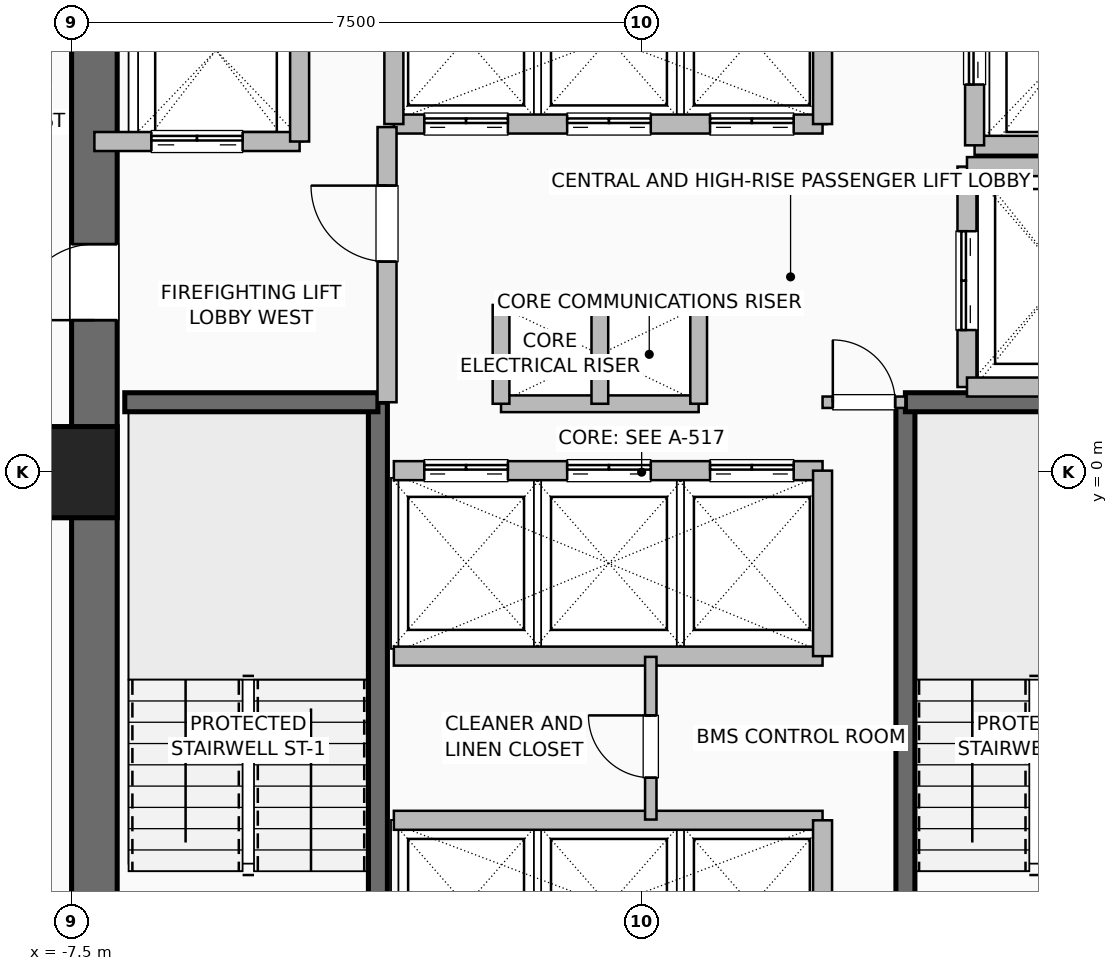
"""IFC4 building model, lengths in metres.
Left out: names, types, materials, properties, quantities, classifications, styles, units other than length and angle.
Written with IfcOpenShell. Run it as: python <this file> out.ifc"""

import sys

from ifc_helpers import new_model, si_unit, direction, frame, frame_2d, origin, origin_2d, place, context, subcontext, project, spatial, rectangle, hollow_rectangle, extrude, element, fill, save


model = new_model("IFC4")
c1 = context("Model", 3, precision=1e-05, world=origin(), true_north=direction((0.0, 1.0)))
c2 = subcontext(c1, "Body", "Model", "MODEL_VIEW")
j1 = project(units=[si_unit("LENGTHUNIT", "METRE"), si_unit("PLANEANGLEUNIT", "RADIAN")], contexts=[c1])
p1 = place(None, origin())
s1 = spatial("IfcSite", under=j1, at=p1, CompositionType="ELEMENT")
p2 = place(p1, origin())
s2 = spatial("IfcBuilding", under=s1, at=p2, CompositionType="ELEMENT")
p3 = place(p2, frame((0.0, 0.0, 62.0)))
s3 = spatial("IfcBuildingStorey", under=s2, at=p3, CompositionType="ELEMENT", Elevation=62.0)
p4 = place(p3, frame((-7.5, 0.0, 0.0), z_axis=(0.0, 0.0, 1.0), x_axis=(1.0, 0.0, 0.0)))
e1 = element("IfcColumn", 1, at=p4, inside=s3, PredefinedType="COLUMN", context=c2, shape_type="SweptSolid", body=[
    extrude(hollow_rectangle(XDim=1.2, YDim=1.2, WallThickness=0.055, at=origin_2d()), origin(), (0.0, 0.0, 1.0), 3.5),
])
p5 = place(p3, frame((-7.2, -7.5, 0.0), z_axis=(0.0, 0.0, 1.0), x_axis=(0.0, 1.0, 0.0)))
e2 = element("IfcWall", 2, at=p5, inside=s3, PredefinedType="SHEAR", context=c2, shape_type="SweptSolid", body=[
    extrude(rectangle(XDim=15.0, YDim=0.6, at=frame_2d((7.5, 0.0))), origin(), (0.0, 0.0, 1.0), 3.25),
])
p6 = place(p5, frame((9.5, 0.0, 0.0)))
e3 = element("IfcOpeningElement", 3, at=p6, cuts=e2, PredefinedType="OPENING", context=c2, shape_type="SweptSolid", body=[
    extrude(rectangle(XDim=1.0, YDim=2.08, at=frame_2d((0.5, 1.04))), frame((0.0, 0.31, 0.0), z_axis=(0.0, -1.0, 0.0), x_axis=(1.0, 0.0, 0.0)), (0.0, 0.0, 1.0), 0.62),
])
p7 = place(p3, frame((-3.47, -6.8, 0.0), z_axis=(0.0, 0.0, 1.0), x_axis=(0.0, 1.0, 0.0)))
e4 = element("IfcWall", 4, at=p7, inside=s3, PredefinedType="SHEAR", context=c2, shape_type="SweptSolid", body=[
    extrude(rectangle(XDim=7.72, YDim=0.25, at=frame_2d((3.86, 0.0))), origin(), (0.0, 0.0, 1.0), 3.25),
])
p8 = place(p3, frame((-6.8, 0.92, 0.0), z_axis=(0.0, 0.0, 1.0), x_axis=(1.0, 0.0, 0.0)))
e5 = element("IfcWall", 5, at=p8, inside=s3, PredefinedType="SHEAR", context=c2, shape_type="SweptSolid", body=[
    extrude(rectangle(XDim=3.33, YDim=0.25, at=frame_2d((1.665, 0.0))), origin(), (0.0, 0.0, 1.0), 3.25),
])
p9 = place(p3, frame((3.47, -6.8, 0.0), z_axis=(0.0, 0.0, 1.0), x_axis=(0.0, 1.0, 0.0)))
e6 = element("IfcWall", 6, at=p9, inside=s3, PredefinedType="SHEAR", context=c2, shape_type="SweptSolid", body=[
    extrude(rectangle(XDim=7.72, YDim=0.25, at=frame_2d((3.86, 0.0))), origin(), (0.0, 0.0, 1.0), 3.25),
])
p10 = place(p3, frame((3.47, 0.92, 0.0), z_axis=(0.0, 0.0, 1.0), x_axis=(1.0, 0.0, 0.0)))
e7 = element("IfcWall", 7, at=p10, inside=s3, PredefinedType="SHEAR", context=c2, shape_type="SweptSolid", body=[
    extrude(rectangle(XDim=3.33, YDim=0.25, at=frame_2d((1.665, 0.0))), origin(), (0.0, 0.0, 1.0), 3.25),
])
for number, where, z_axis, x_axis in (
    (8, (-1.85, 2.2, 0.0), (0.0, 0.0, 1.0), (1.0, 0.0, 0.0)),
    (9, (-1.85, 0.9, 0.0), (0.0, 0.0, 1.0), (1.0, 0.0, 0.0)),
):
    element("IfcWall", number, at=place(p3, frame(where, z_axis=z_axis, x_axis=x_axis)), inside=s3, PredefinedType="PARTITIONING", context=c2, shape_type="SweptSolid", body=[
        extrude(rectangle(XDim=2.6, YDim=0.22, at=frame_2d((1.3, 0.0))), origin(), (0.0, 0.0, 1.0), 3.25),
    ])
for number, where, z_axis, x_axis in (
    (10, (-0.55, 0.9, 0.0), (0.0, 0.0, 1.0), (0.0, 1.0, 0.0)),
    (11, (0.75, 0.9, 0.0), (0.0, 0.0, 1.0), (0.0, 1.0, 0.0)),
    (12, (-1.85, 0.9, 0.0), (0.0, 0.0, 1.0), (0.0, 1.0, 0.0)),
):
    element("IfcWall", number, at=place(p3, frame(where, z_axis=z_axis, x_axis=x_axis)), inside=s3, PredefinedType="PARTITIONING", context=c2, shape_type="SweptSolid", body=[
        extrude(rectangle(XDim=1.3, YDim=0.22, at=frame_2d((0.65, 0.0))), origin(), (0.0, 0.0, 1.0), 3.25),
    ])
p11 = place(p3, frame((-3.26, -4.58, 0.0), z_axis=(0.0, 0.0, 1.0), x_axis=(1.0, 0.0, 0.0)))
e13 = element("IfcWall", 13, at=p11, inside=s3, PredefinedType="SHEAR", context=c2, shape_type="SweptSolid", body=[
    extrude(rectangle(XDim=5.64, YDim=0.25, at=frame_2d((2.82, 0.0))), origin(), (0.0, 0.0, 1.0), 3.25),
])
p12 = place(p3, frame((2.38, -6.8, 0.0), z_axis=(0.0, 0.0, 1.0), x_axis=(0.0, 1.0, 0.0)))
e14 = element("IfcWall", 14, at=p12, inside=s3, PredefinedType="SHEAR", context=c2, shape_type="SweptSolid", body=[
    extrude(rectangle(XDim=2.22, YDim=0.25, at=frame_2d((1.11, 0.0))), origin(), (0.0, 0.0, 1.0), 3.25),
])
p13 = place(p3, frame((-3.26, 0.02, 0.0), z_axis=(0.0, 0.0, 1.0), x_axis=(1.0, 0.0, 0.0)))
e15 = element("IfcWall", 15, at=p13, inside=s3, PredefinedType="SHEAR", context=c2, shape_type="SweptSolid", body=[
    extrude(rectangle(XDim=5.64, YDim=0.25, at=frame_2d((2.82, 0.0))), origin(), (0.0, 0.0, 1.0), 3.25),
])
p14 = place(p13, frame((0.4, 0.0, 0.0)))
e16 = element("IfcOpeningElement", 16, at=p14, cuts=e15, PredefinedType="OPENING", context=c2, shape_type="SweptSolid", body=[
    extrude(rectangle(XDim=1.1, YDim=2.2, at=frame_2d((0.55, 1.1))), frame((0.0, 0.135, 0.0), z_axis=(0.0, -1.0, 0.0), x_axis=(1.0, 0.0, 0.0)), (0.0, 0.0, 1.0), 0.27),
])
p15 = place(p13, frame((2.28, 0.0, 0.0)))
e17 = element("IfcOpeningElement", 17, at=p15, cuts=e15, PredefinedType="OPENING", context=c2, shape_type="SweptSolid", body=[
    extrude(rectangle(XDim=1.1, YDim=2.2, at=frame_2d((0.55, 1.1))), frame((0.0, 0.135, 0.0), z_axis=(0.0, -1.0, 0.0), x_axis=(1.0, 0.0, 0.0)), (0.0, 0.0, 1.0), 0.27),
])
p16 = place(p13, frame((4.16, 0.0, 0.0)))
e18 = element("IfcOpeningElement", 18, at=p16, cuts=e15, PredefinedType="OPENING", context=c2, shape_type="SweptSolid", body=[
    extrude(rectangle(XDim=1.1, YDim=2.2, at=frame_2d((0.55, 1.1))), frame((0.0, 0.135, 0.0), z_axis=(0.0, -1.0, 0.0), x_axis=(1.0, 0.0, 0.0)), (0.0, 0.0, 1.0), 0.27),
])
p17 = place(p3, frame((-3.26, -2.42, 0.0), z_axis=(0.0, 0.0, 1.0), x_axis=(1.0, 0.0, 0.0)))
e19 = element("IfcWall", 19, at=p17, inside=s3, PredefinedType="SHEAR", context=c2, shape_type="SweptSolid", body=[
    extrude(rectangle(XDim=5.64, YDim=0.25, at=frame_2d((2.82, 0.0))), origin(), (0.0, 0.0, 1.0), 3.25),
])
p18 = place(p3, frame((2.38, -2.42, 0.0), z_axis=(0.0, 0.0, 1.0), x_axis=(0.0, 1.0, 0.0)))
e20 = element("IfcWall", 20, at=p18, inside=s3, PredefinedType="SHEAR", context=c2, shape_type="SweptSolid", body=[
    extrude(rectangle(XDim=2.44, YDim=0.25, at=frame_2d((1.22, 0.0))), origin(), (0.0, 0.0, 1.0), 3.25),
])
p19 = place(p3, frame((-3.26, 4.58, 0.0), z_axis=(0.0, 0.0, 1.0), x_axis=(1.0, 0.0, 0.0)))
e21 = element("IfcWall", 21, at=p19, inside=s3, PredefinedType="SHEAR", context=c2, shape_type="SweptSolid", body=[
    extrude(rectangle(XDim=5.64, YDim=0.25, at=frame_2d((2.82, 0.0))), origin(), (0.0, 0.0, 1.0), 3.25),
])
p20 = place(p19, frame((0.4, 0.0, 0.0)))
e22 = element("IfcOpeningElement", 22, at=p20, cuts=e21, PredefinedType="OPENING", context=c2, shape_type="SweptSolid", body=[
    extrude(rectangle(XDim=1.1, YDim=2.2, at=frame_2d((0.55, 1.1))), frame((0.0, 0.135, 0.0), z_axis=(0.0, -1.0, 0.0), x_axis=(1.0, 0.0, 0.0)), (0.0, 0.0, 1.0), 0.27),
])
p21 = place(p19, frame((2.28, 0.0, 0.0)))
e23 = element("IfcOpeningElement", 23, at=p21, cuts=e21, PredefinedType="OPENING", context=c2, shape_type="SweptSolid", body=[
    extrude(rectangle(XDim=1.1, YDim=2.2, at=frame_2d((0.55, 1.1))), frame((0.0, 0.135, 0.0), z_axis=(0.0, -1.0, 0.0), x_axis=(1.0, 0.0, 0.0)), (0.0, 0.0, 1.0), 0.27),
])
p22 = place(p19, frame((4.16, 0.0, 0.0)))
e24 = element("IfcOpeningElement", 24, at=p22, cuts=e21, PredefinedType="OPENING", context=c2, shape_type="SweptSolid", body=[
    extrude(rectangle(XDim=1.1, YDim=2.2, at=frame_2d((0.55, 1.1))), frame((0.0, 0.135, 0.0), z_axis=(0.0, -1.0, 0.0), x_axis=(1.0, 0.0, 0.0)), (0.0, 0.0, 1.0), 0.27),
])
for number, where, z_axis, x_axis in (
    (25, (-3.26, 4.58, 0.0), (0.0, 0.0, 1.0), (0.0, 1.0, 0.0)),
    (26, (2.38, 4.58, 0.0), (0.0, 0.0, 1.0), (0.0, 1.0, 0.0)),
):
    element("IfcWall", number, at=place(p3, frame(where, z_axis=z_axis, x_axis=x_axis)), inside=s3, PredefinedType="SHEAR", context=c2, shape_type="SweptSolid", body=[
        extrude(rectangle(XDim=2.22, YDim=0.25, at=frame_2d((1.11, 0.0))), origin(), (0.0, 0.0, 1.0), 3.25),
    ])
p23 = place(p3, frame((-7.2, 4.35, 0.0), z_axis=(0.0, 0.0, 1.0), x_axis=(1.0, 0.0, 0.0)))
e27 = element("IfcWall", 27, at=p23, inside=s3, PredefinedType="SHEAR", context=c2, shape_type="SweptSolid", body=[
    extrude(rectangle(XDim=2.7, YDim=0.25, at=frame_2d((1.35, 0.0))), origin(), (0.0, 0.0, 1.0), 3.25),
])
p24 = place(p23, frame((0.75, 0.0, 0.0)))
e28 = element("IfcOpeningElement", 28, at=p24, cuts=e27, PredefinedType="OPENING", context=c2, shape_type="SweptSolid", body=[
    extrude(rectangle(XDim=1.2, YDim=2.2, at=frame_2d((0.6, 1.1))), frame((0.0, 0.135, 0.0), z_axis=(0.0, -1.0, 0.0), x_axis=(1.0, 0.0, 0.0)), (0.0, 0.0, 1.0), 0.27),
])
p25 = place(p3, frame((-4.5, 4.35, 0.0), z_axis=(0.0, 0.0, 1.0), x_axis=(0.0, 1.0, 0.0)))
e29 = element("IfcWall", 29, at=p25, inside=s3, PredefinedType="SHEAR", context=c2, shape_type="SweptSolid", body=[
    extrude(rectangle(XDim=2.85, YDim=0.25, at=frame_2d((1.425, 0.0))), origin(), (0.0, 0.0, 1.0), 3.25),
])
p26 = place(p3, frame((4.38, 4.3, 0.0), z_axis=(0.0, 0.0, 1.0), x_axis=(1.0, 0.0, 0.0)))
e30 = element("IfcWall", 30, at=p26, inside=s3, PredefinedType="SHEAR", context=c2, shape_type="SweptSolid", body=[
    extrude(rectangle(XDim=2.42, YDim=0.25, at=frame_2d((1.21, 0.0))), origin(), (0.0, 0.0, 1.0), 3.25),
])
p27 = place(p3, frame((4.38, 4.3, 0.0), z_axis=(0.0, 0.0, 1.0), x_axis=(0.0, 1.0, 0.0)))
e31 = element("IfcWall", 31, at=p27, inside=s3, PredefinedType="SHEAR", context=c2, shape_type="SweptSolid", body=[
    extrude(rectangle(XDim=2.5, YDim=0.25, at=frame_2d((1.25, 0.0))), origin(), (0.0, 0.0, 1.0), 3.25),
])
p28 = place(p27, frame((0.8, 0.0, 0.0)))
e32 = element("IfcOpeningElement", 32, at=p28, cuts=e31, PredefinedType="OPENING", context=c2, shape_type="SweptSolid", body=[
    extrude(rectangle(XDim=1.2, YDim=2.2, at=frame_2d((0.6, 1.1))), frame((0.0, 0.135, 0.0), z_axis=(0.0, -1.0, 0.0), x_axis=(1.0, 0.0, 0.0)), (0.0, 0.0, 1.0), 0.27),
])
p29 = place(p3, frame((4.28, 1.12, 0.0), z_axis=(0.0, 0.0, 1.0), x_axis=(0.0, 1.0, 0.0)))
e33 = element("IfcWall", 33, at=p29, inside=s3, PredefinedType="SHEAR", context=c2, shape_type="SweptSolid", body=[
    extrude(rectangle(XDim=2.9, YDim=0.25, at=frame_2d((1.45, 0.0))), origin(), (0.0, 0.0, 1.0), 3.25),
])
p30 = place(p29, frame((0.75, 0.0, 0.0)))
e34 = element("IfcOpeningElement", 34, at=p30, cuts=e33, PredefinedType="OPENING", context=c2, shape_type="SweptSolid", body=[
    extrude(rectangle(XDim=1.3, YDim=2.3, at=frame_2d((0.65, 1.15))), frame((0.0, 0.135, 0.0), z_axis=(0.0, -1.0, 0.0), x_axis=(1.0, 0.0, 0.0)), (0.0, 0.0, 1.0), 0.27),
])
for number, where, z_axis, x_axis in (
    (35, (4.28, 1.12, 0.0), (0.0, 0.0, 1.0), (1.0, 0.0, 0.0)),
    (36, (4.28, 4.02, 0.0), (0.0, 0.0, 1.0), (1.0, 0.0, 0.0)),
):
    element("IfcWall", number, at=place(p3, frame(where, z_axis=z_axis, x_axis=x_axis)), inside=s3, PredefinedType="SHEAR", context=c2, shape_type="SweptSolid", body=[
        extrude(rectangle(XDim=2.52, YDim=0.25, at=frame_2d((1.26, 0.0))), origin(), (0.0, 0.0, 1.0), 3.25),
    ])
p31 = place(p3, frame((-3.35, 0.92, 0.0), z_axis=(0.0, 0.0, 1.0), x_axis=(0.0, 1.0, 0.0)))
e37 = element("IfcWall", 37, at=p31, inside=s3, PredefinedType="SHEAR", context=c2, shape_type="SweptSolid", body=[
    extrude(rectangle(XDim=3.62, YDim=0.25, at=frame_2d((1.81, 0.0))), origin(), (0.0, 0.0, 1.0), 3.25),
])
p32 = place(p31, frame((1.85, 0.0, 0.0)))
e38 = element("IfcOpeningElement", 38, at=p32, cuts=e37, PredefinedType="OPENING", context=c2, shape_type="SweptSolid", body=[
    extrude(rectangle(XDim=1.0, YDim=2.08, at=frame_2d((0.5, 1.04))), frame((0.0, 0.135, 0.0), z_axis=(0.0, -1.0, 0.0), x_axis=(1.0, 0.0, 0.0)), (0.0, 0.0, 1.0), 0.27),
])
p33 = place(p3, frame((2.38, 0.92, 0.0), z_axis=(0.0, 0.0, 1.0), x_axis=(1.0, 0.0, 0.0)))
e39 = element("IfcWall", 39, at=p33, inside=s3, PredefinedType="PARTITIONING", context=c2, shape_type="SweptSolid", body=[
    extrude(rectangle(XDim=1.09, YDim=0.15, at=frame_2d((0.545, 0.0))), origin(), (0.0, 0.0, 1.0), 3.25),
])
p34 = place(p33, frame((0.135, 0.0, 0.0)))
e40 = element("IfcOpeningElement", 40, at=p34, cuts=e39, PredefinedType="OPENING", context=c2, shape_type="SweptSolid", body=[
    extrude(rectangle(XDim=0.82, YDim=2.05, at=frame_2d((0.41, 1.025))), frame((0.0, 0.085, 0.0), z_axis=(0.0, -1.0, 0.0), x_axis=(1.0, 0.0, 0.0)), (0.0, 0.0, 1.0), 0.17),
])
p35 = place(p3, frame((0.12, -4.57, 0.0), z_axis=(0.0, 0.0, 1.0), x_axis=(0.0, 1.0, 0.0)))
e41 = element("IfcWall", 41, at=p35, inside=s3, PredefinedType="PARTITIONING", context=c2, shape_type="SweptSolid", body=[
    extrude(rectangle(XDim=2.14, YDim=0.15, at=frame_2d((1.07, 0.0))), origin(), (0.0, 0.0, 1.0), 3.25),
])
p36 = place(p35, frame((0.55, 0.0, 0.0)))
e42 = element("IfcOpeningElement", 42, at=p36, cuts=e41, PredefinedType="OPENING", context=c2, shape_type="SweptSolid", body=[
    extrude(rectangle(XDim=0.82, YDim=2.05, at=frame_2d((0.41, 1.025))), frame((0.0, 0.085, 0.0), z_axis=(0.0, -1.0, 0.0), x_axis=(1.0, 0.0, 0.0)), (0.0, 0.0, 1.0), 0.17),
])
p37 = place(p6, origin())
e43 = element("IfcDoor", 43, at=p37, inside=s3, OperationType="SINGLE_SWING_LEFT", PredefinedType="DOOR", context=c2, shape_type="SweptSolid", body=[
    extrude(rectangle(XDim=1.0, YDim=2.08, at=frame_2d((0.5, 1.04))), frame((0.0, 0.025, 0.0), z_axis=(0.0, -1.0, 0.0), x_axis=(1.0, 0.0, 0.0)), (0.0, 0.0, 1.0), 0.05),
])
fill(e3, e43)
p38 = place(p14, origin())
e44 = element("IfcDoor", 44, at=p38, inside=s3, OperationType="DOUBLE_DOOR_SLIDING", PredefinedType="DOOR", context=c2, shape_type="SweptSolid", body=[
    extrude(rectangle(XDim=1.1, YDim=2.2, at=frame_2d((0.55, 1.1))), frame((0.0, 0.025, 0.0), z_axis=(0.0, -1.0, 0.0), x_axis=(1.0, 0.0, 0.0)), (0.0, 0.0, 1.0), 0.05),
])
fill(e16, e44)
p39 = place(p15, origin())
e45 = element("IfcDoor", 45, at=p39, inside=s3, OperationType="DOUBLE_DOOR_SLIDING", PredefinedType="DOOR", context=c2, shape_type="SweptSolid", body=[
    extrude(rectangle(XDim=1.1, YDim=2.2, at=frame_2d((0.55, 1.1))), frame((0.0, 0.025, 0.0), z_axis=(0.0, -1.0, 0.0), x_axis=(1.0, 0.0, 0.0)), (0.0, 0.0, 1.0), 0.05),
])
fill(e17, e45)
p40 = place(p16, origin())
e46 = element("IfcDoor", 46, at=p40, inside=s3, OperationType="DOUBLE_DOOR_SLIDING", PredefinedType="DOOR", context=c2, shape_type="SweptSolid", body=[
    extrude(rectangle(XDim=1.1, YDim=2.2, at=frame_2d((0.55, 1.1))), frame((0.0, 0.025, 0.0), z_axis=(0.0, -1.0, 0.0), x_axis=(1.0, 0.0, 0.0)), (0.0, 0.0, 1.0), 0.05),
])
fill(e18, e46)
p41 = place(p20, origin())
e47 = element("IfcDoor", 47, at=p41, inside=s3, OperationType="DOUBLE_DOOR_SLIDING", PredefinedType="DOOR", context=c2, shape_type="SweptSolid", body=[
    extrude(rectangle(XDim=1.1, YDim=2.2, at=frame_2d((0.55, 1.1))), frame((0.0, 0.025, 0.0), z_axis=(0.0, -1.0, 0.0), x_axis=(1.0, 0.0, 0.0)), (0.0, 0.0, 1.0), 0.05),
])
fill(e22, e47)
p42 = place(p21, origin())
e48 = element("IfcDoor", 48, at=p42, inside=s3, OperationType="DOUBLE_DOOR_SLIDING", PredefinedType="DOOR", context=c2, shape_type="SweptSolid", body=[
    extrude(rectangle(XDim=1.1, YDim=2.2, at=frame_2d((0.55, 1.1))), frame((0.0, 0.025, 0.0), z_axis=(0.0, -1.0, 0.0), x_axis=(1.0, 0.0, 0.0)), (0.0, 0.0, 1.0), 0.05),
])
fill(e23, e48)
p43 = place(p22, origin())
e49 = element("IfcDoor", 49, at=p43, inside=s3, OperationType="DOUBLE_DOOR_SLIDING", PredefinedType="DOOR", context=c2, shape_type="SweptSolid", body=[
    extrude(rectangle(XDim=1.1, YDim=2.2, at=frame_2d((0.55, 1.1))), frame((0.0, 0.025, 0.0), z_axis=(0.0, -1.0, 0.0), x_axis=(1.0, 0.0, 0.0)), (0.0, 0.0, 1.0), 0.05),
])
fill(e24, e49)
p44 = place(p24, origin())
e50 = element("IfcDoor", 50, at=p44, inside=s3, OperationType="DOUBLE_DOOR_SLIDING", PredefinedType="DOOR", context=c2, shape_type="SweptSolid", body=[
    extrude(rectangle(XDim=1.2, YDim=2.2, at=frame_2d((0.6, 1.1))), frame((0.0, 0.025, 0.0), z_axis=(0.0, -1.0, 0.0), x_axis=(1.0, 0.0, 0.0)), (0.0, 0.0, 1.0), 0.05),
])
fill(e28, e50)
p45 = place(p28, origin())
e51 = element("IfcDoor", 51, at=p45, inside=s3, OperationType="DOUBLE_DOOR_SLIDING", PredefinedType="DOOR", context=c2, shape_type="SweptSolid", body=[
    extrude(rectangle(XDim=1.2, YDim=2.2, at=frame_2d((0.6, 1.1))), frame((0.0, 0.025, 0.0), z_axis=(0.0, -1.0, 0.0), x_axis=(1.0, 0.0, 0.0)), (0.0, 0.0, 1.0), 0.05),
])
fill(e32, e51)
p46 = place(p30, origin())
e52 = element("IfcDoor", 52, at=p46, inside=s3, OperationType="DOUBLE_DOOR_SLIDING", PredefinedType="DOOR", context=c2, shape_type="SweptSolid", body=[
    extrude(rectangle(XDim=1.3, YDim=2.3, at=frame_2d((0.65, 1.15))), frame((0.0, 0.025, 0.0), z_axis=(0.0, -1.0, 0.0), x_axis=(1.0, 0.0, 0.0)), (0.0, 0.0, 1.0), 0.05),
])
fill(e34, e52)
p47 = place(p32, origin())
e53 = element("IfcDoor", 53, at=p47, inside=s3, OperationType="SINGLE_SWING_RIGHT", PredefinedType="DOOR", context=c2, shape_type="SweptSolid", body=[
    extrude(rectangle(XDim=1.0, YDim=2.08, at=frame_2d((0.5, 1.04))), frame((0.0, 0.025, 0.0), z_axis=(0.0, -1.0, 0.0), x_axis=(1.0, 0.0, 0.0)), (0.0, 0.0, 1.0), 0.05),
])
fill(e38, e53)
p48 = place(p34, origin())
e54 = element("IfcDoor", 54, at=p48, inside=s3, OperationType="SINGLE_SWING_LEFT", PredefinedType="DOOR", context=c2, shape_type="SweptSolid", body=[
    extrude(rectangle(XDim=0.82, YDim=2.05, at=frame_2d((0.41, 1.025))), frame((0.0, 0.025, 0.0), z_axis=(0.0, -1.0, 0.0), x_axis=(1.0, 0.0, 0.0)), (0.0, 0.0, 1.0), 0.05),
])
fill(e40, e54)
p49 = place(p36, origin())
e55 = element("IfcDoor", 55, at=p49, inside=s3, OperationType="SINGLE_SWING_RIGHT", PredefinedType="DOOR", context=c2, shape_type="SweptSolid", body=[
    extrude(rectangle(XDim=0.82, YDim=2.05, at=frame_2d((0.41, 1.025))), frame((0.0, 0.025, 0.0), z_axis=(0.0, -1.0, 0.0), x_axis=(1.0, 0.0, 0.0)), (0.0, 0.0, 1.0), 0.05),
])
fill(e42, e55)
save(model, sys.argv[1])
